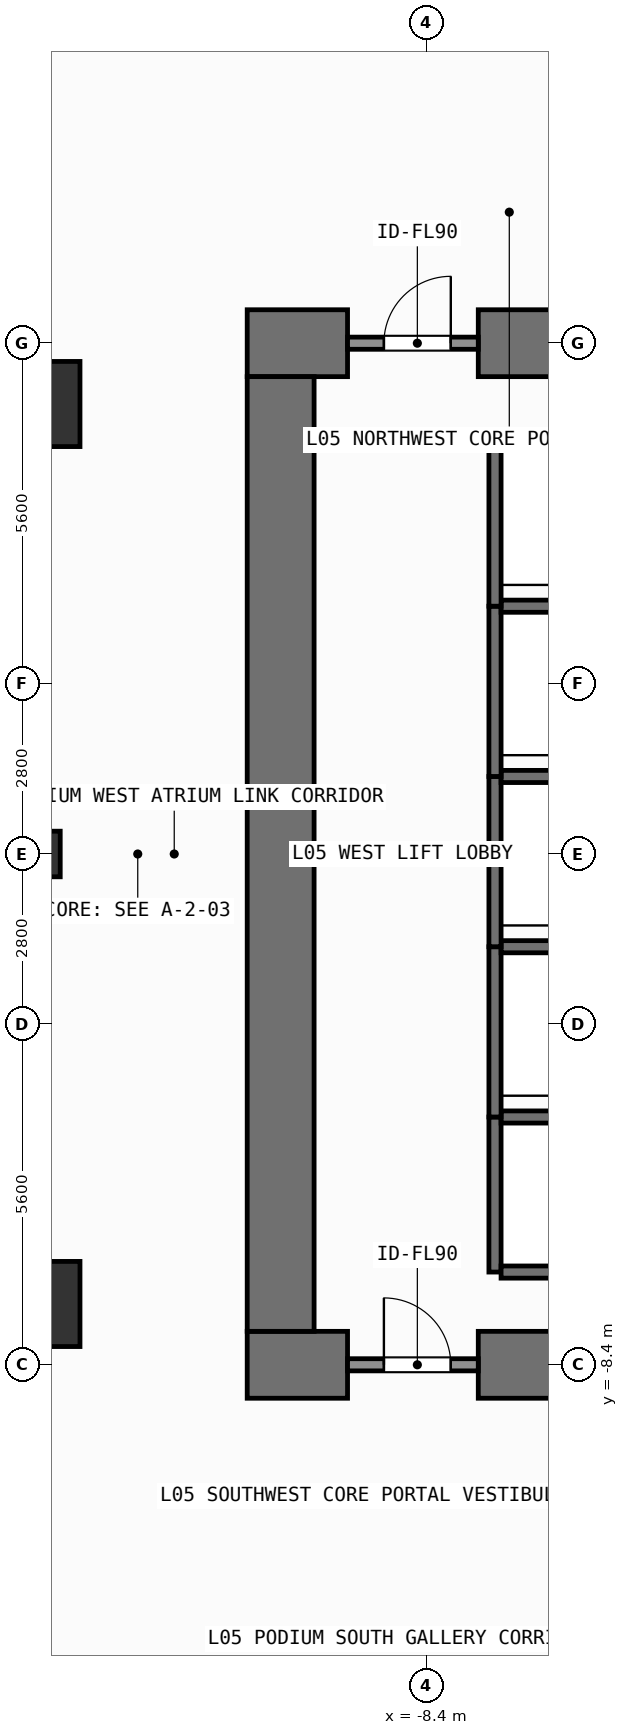
"""IFC4 building model, lengths in metres.
Left out: names, types, materials, properties, quantities, classifications, styles, units other than length and angle.
Written with IfcOpenShell. Run it as: python <this file> out.ifc"""

import sys

from ifc_helpers import new_model, si_unit, direction, frame, frame_2d, origin, origin_2d, place, context, subcontext, project, spatial, rectangle, extrude, element, fill, save


model = new_model("IFC4")
c1 = context("Model", 3, precision=1e-05, world=origin(), true_north=direction((0.0, 1.0)))
c2 = subcontext(c1, "Body", "Model", "MODEL_VIEW")
j1 = project(units=[si_unit("LENGTHUNIT", "METRE"), si_unit("PLANEANGLEUNIT", "RADIAN")], contexts=[c1])
p1 = place(None, origin())
s1 = spatial("IfcSite", under=j1, at=p1, CompositionType="ELEMENT")
p2 = place(p1, origin())
s2 = spatial("IfcBuilding", under=s1, at=p2, CompositionType="ELEMENT")
p3 = place(p2, frame((0.0, 0.0, 17.4)))
s3 = spatial("IfcBuildingStorey", under=s2, at=p3, CompositionType="ELEMENT", Elevation=17.4)
p4 = place(p3, frame((-11.35, -8.4, 0.0), z_axis=(0.0, 0.0, 1.0), x_axis=(1.0, 0.0, 0.0)))
e1 = element("IfcWall", 1, at=p4, inside=s3, PredefinedType="SHEAR", context=c2, shape_type="SweptSolid", body=[
    extrude(rectangle(XDim=1.65, YDim=1.1, at=frame_2d((0.825, 0.0))), origin(), (0.0, 0.0, 1.0), 4.2),
])
p5 = place(p3, frame((-7.55, -8.4, 0.0), z_axis=(0.0, 0.0, 1.0), x_axis=(1.0, 0.0, 0.0)))
e2 = element("IfcWall", 2, at=p5, inside=s3, PredefinedType="SHEAR", context=c2, shape_type="SweptSolid", body=[
    extrude(rectangle(XDim=3.35, YDim=1.1, at=frame_2d((1.675, 0.0))), origin(), (0.0, 0.0, 1.0), 4.2),
])
p6 = place(p3, frame((-11.35, 8.4, 0.0), z_axis=(0.0, 0.0, 1.0), x_axis=(1.0, 0.0, 0.0)))
e3 = element("IfcWall", 3, at=p6, inside=s3, PredefinedType="SHEAR", context=c2, shape_type="SweptSolid", body=[
    extrude(rectangle(XDim=1.65, YDim=1.1, at=frame_2d((0.825, 0.0))), origin(), (0.0, 0.0, 1.0), 4.2),
])
p7 = place(p3, frame((-7.55, 8.4, 0.0), z_axis=(0.0, 0.0, 1.0), x_axis=(1.0, 0.0, 0.0)))
e4 = element("IfcWall", 4, at=p7, inside=s3, PredefinedType="SHEAR", context=c2, shape_type="SweptSolid", body=[
    extrude(rectangle(XDim=16.5, YDim=1.1, at=frame_2d((8.25, 0.0))), origin(), (0.0, 0.0, 1.0), 4.2),
])
p8 = place(p3, frame((-10.8, -7.85, 0.0), z_axis=(0.0, 0.0, 1.0), x_axis=(0.0, 1.0, 0.0)))
e5 = element("IfcWall", 5, at=p8, inside=s3, PredefinedType="SHEAR", context=c2, shape_type="SweptSolid", body=[
    extrude(rectangle(XDim=15.7, YDim=1.1, at=frame_2d((7.85, 0.0))), origin(), (0.0, 0.0, 1.0), 4.2),
])
for number, where, z_axis, x_axis in (
    (6, (-14.8, -7.4, 0.0), (0.0, 0.0, 1.0), (1.0, 0.0, 0.0)),
    (7, (-14.8, 7.4, 0.0), (0.0, 0.0, 1.0), (1.0, 0.0, 0.0)),
):
    element("IfcColumn", number, at=place(p3, frame(where, z_axis=z_axis, x_axis=x_axis)), inside=s3, PredefinedType="COLUMN", context=c2, shape_type="SweptSolid", body=[
        extrude(rectangle(XDim=1.4, YDim=1.4, at=origin_2d()), origin(), (0.0, 0.0, 1.0), 4.2),
    ])
p9 = place(p3, frame((-14.8, 0.0, 0.0), z_axis=(0.0, 0.0, 1.0), x_axis=(1.0, 0.0, 0.0)))
e8 = element("IfcColumn", 8, at=p9, inside=s3, PredefinedType="COLUMN", context=c2, shape_type="SweptSolid", body=[
    extrude(rectangle(XDim=0.75, YDim=0.75, at=origin_2d()), origin(), (0.0, 0.0, 1.0), 4.2),
])
p10 = place(p3, frame((-7.275, -6.875, 0.0), z_axis=(0.0, 0.0, 1.0), x_axis=(0.0, 1.0, 0.0)))
e9 = element("IfcWall", 9, at=p10, inside=s3, PredefinedType="SHEAR", context=c2, shape_type="SweptSolid", body=[
    extrude(rectangle(XDim=2.55, YDim=0.2, at=frame_2d((1.275, 0.0))), origin(), (0.0, 0.0, 1.0), 3.96),
])
for number, where, z_axis, x_axis in (
    (10, (-7.175, -6.875, 0.0), (0.0, 0.0, 1.0), (1.0, 0.0, 0.0)),
    (11, (-7.175, -4.325, 0.0), (0.0, 0.0, 1.0), (1.0, 0.0, 0.0)),
):
    element("IfcWall", number, at=place(p3, frame(where, z_axis=z_axis, x_axis=x_axis)), inside=s3, PredefinedType="SHEAR", context=c2, shape_type="SweptSolid", body=[
        extrude(rectangle(XDim=2.35, YDim=0.2, at=frame_2d((1.175, 0.0))), origin(), (0.0, 0.0, 1.0), 3.96),
    ])
p11 = place(p3, frame((-7.275, -4.325, 0.0), z_axis=(0.0, 0.0, 1.0), x_axis=(0.0, 1.0, 0.0)))
e12 = element("IfcWall", 12, at=p11, inside=s3, PredefinedType="SHEAR", context=c2, shape_type="SweptSolid", body=[
    extrude(rectangle(XDim=2.8, YDim=0.2, at=frame_2d((1.4, 0.0))), origin(), (0.0, 0.0, 1.0), 3.96),
])
p12 = place(p3, frame((-7.175, -1.525, 0.0), z_axis=(0.0, 0.0, 1.0), x_axis=(1.0, 0.0, 0.0)))
e13 = element("IfcWall", 13, at=p12, inside=s3, PredefinedType="SHEAR", context=c2, shape_type="SweptSolid", body=[
    extrude(rectangle(XDim=2.35, YDim=0.2, at=frame_2d((1.175, 0.0))), origin(), (0.0, 0.0, 1.0), 3.96),
])
p13 = place(p3, frame((-7.275, -1.525, 0.0), z_axis=(0.0, 0.0, 1.0), x_axis=(0.0, 1.0, 0.0)))
e14 = element("IfcWall", 14, at=p13, inside=s3, PredefinedType="SHEAR", context=c2, shape_type="SweptSolid", body=[
    extrude(rectangle(XDim=2.8, YDim=0.2, at=frame_2d((1.4, 0.0))), origin(), (0.0, 0.0, 1.0), 3.96),
])
p14 = place(p3, frame((-7.175, 1.275, 0.0), z_axis=(0.0, 0.0, 1.0), x_axis=(1.0, 0.0, 0.0)))
e15 = element("IfcWall", 15, at=p14, inside=s3, PredefinedType="SHEAR", context=c2, shape_type="SweptSolid", body=[
    extrude(rectangle(XDim=2.35, YDim=0.2, at=frame_2d((1.175, 0.0))), origin(), (0.0, 0.0, 1.0), 3.96),
])
p15 = place(p3, frame((-7.275, 1.275, 0.0), z_axis=(0.0, 0.0, 1.0), x_axis=(0.0, 1.0, 0.0)))
e16 = element("IfcWall", 16, at=p15, inside=s3, PredefinedType="SHEAR", context=c2, shape_type="SweptSolid", body=[
    extrude(rectangle(XDim=2.8, YDim=0.2, at=frame_2d((1.4, 0.0))), origin(), (0.0, 0.0, 1.0), 3.96),
])
p16 = place(p3, frame((-7.175, 4.075, 0.0), z_axis=(0.0, 0.0, 1.0), x_axis=(1.0, 0.0, 0.0)))
e17 = element("IfcWall", 17, at=p16, inside=s3, PredefinedType="SHEAR", context=c2, shape_type="SweptSolid", body=[
    extrude(rectangle(XDim=2.35, YDim=0.2, at=frame_2d((1.175, 0.0))), origin(), (0.0, 0.0, 1.0), 3.96),
])
p17 = place(p3, frame((-7.275, 4.075, 0.0), z_axis=(0.0, 0.0, 1.0), x_axis=(0.0, 1.0, 0.0)))
e18 = element("IfcWall", 18, at=p17, inside=s3, PredefinedType="SHEAR", context=c2, shape_type="SweptSolid", body=[
    extrude(rectangle(XDim=2.8, YDim=0.2, at=frame_2d((1.4, 0.0))), origin(), (0.0, 0.0, 1.0), 3.96),
])
p18 = place(p3, frame((-7.175, 6.875, 0.0), z_axis=(0.0, 0.0, 1.0), x_axis=(1.0, 0.0, 0.0)))
e19 = element("IfcWall", 19, at=p18, inside=s3, PredefinedType="SHEAR", context=c2, shape_type="SweptSolid", body=[
    extrude(rectangle(XDim=2.35, YDim=0.2, at=frame_2d((1.175, 0.0))), origin(), (0.0, 0.0, 1.0), 3.96),
])
p19 = place(p3, frame((-9.7, -8.4, 0.0), z_axis=(0.0, 0.0, 1.0), x_axis=(1.0, 0.0, 0.0)))
e20 = element("IfcWall", 20, at=p19, inside=s3, PredefinedType="SOLIDWALL", context=c2, shape_type="SweptSolid", body=[
    extrude(rectangle(XDim=2.15, YDim=0.2, at=frame_2d((1.075, 0.0))), origin(), (0.0, 0.0, 1.0), 3.0),
])
p20 = place(p19, frame((0.598, 0.0, 0.0)))
e21 = element("IfcOpeningElement", 21, at=p20, cuts=e20, PredefinedType="OPENING", context=c2, shape_type="SweptSolid", body=[
    extrude(rectangle(XDim=1.1, YDim=2.15, at=frame_2d((0.55, 1.075))), frame((0.0, 0.11, 0.0), z_axis=(0.0, -1.0, 0.0), x_axis=(1.0, 0.0, 0.0)), (0.0, 0.0, 1.0), 0.22),
])
p21 = place(p3, frame((-9.7, 8.4, 0.0), z_axis=(0.0, 0.0, 1.0), x_axis=(1.0, 0.0, 0.0)))
e22 = element("IfcWall", 22, at=p21, inside=s3, PredefinedType="SOLIDWALL", context=c2, shape_type="SweptSolid", body=[
    extrude(rectangle(XDim=2.15, YDim=0.2, at=frame_2d((1.075, 0.0))), origin(), (0.0, 0.0, 1.0), 3.0),
])
p22 = place(p21, frame((0.598, 0.0, 0.0)))
e23 = element("IfcOpeningElement", 23, at=p22, cuts=e22, PredefinedType="OPENING", context=c2, shape_type="SweptSolid", body=[
    extrude(rectangle(XDim=1.1, YDim=2.15, at=frame_2d((0.55, 1.075))), frame((0.0, 0.11, 0.0), z_axis=(0.0, -1.0, 0.0), x_axis=(1.0, 0.0, 0.0)), (0.0, 0.0, 1.0), 0.22),
])
p23 = place(p20, origin())
e24 = element("IfcDoor", 24, at=p23, inside=s3, OperationType="SINGLE_SWING_LEFT", PredefinedType="DOOR", context=c2, shape_type="SweptSolid", body=[
    extrude(rectangle(XDim=1.1, YDim=2.15, at=frame_2d((0.55, 1.075))), frame((0.0, 0.025, 0.0), z_axis=(0.0, -1.0, 0.0), x_axis=(1.0, 0.0, 0.0)), (0.0, 0.0, 1.0), 0.05),
])
fill(e21, e24)
p24 = place(p22, origin())
e25 = element("IfcDoor", 25, at=p24, inside=s3, OperationType="SINGLE_SWING_RIGHT", PredefinedType="DOOR", context=c2, shape_type="SweptSolid", body=[
    extrude(rectangle(XDim=1.1, YDim=2.15, at=frame_2d((0.55, 1.075))), frame((0.0, 0.025, 0.0), z_axis=(0.0, -1.0, 0.0), x_axis=(1.0, 0.0, 0.0)), (0.0, 0.0, 1.0), 0.05),
])
fill(e23, e25)
save(model, sys.argv[1])
